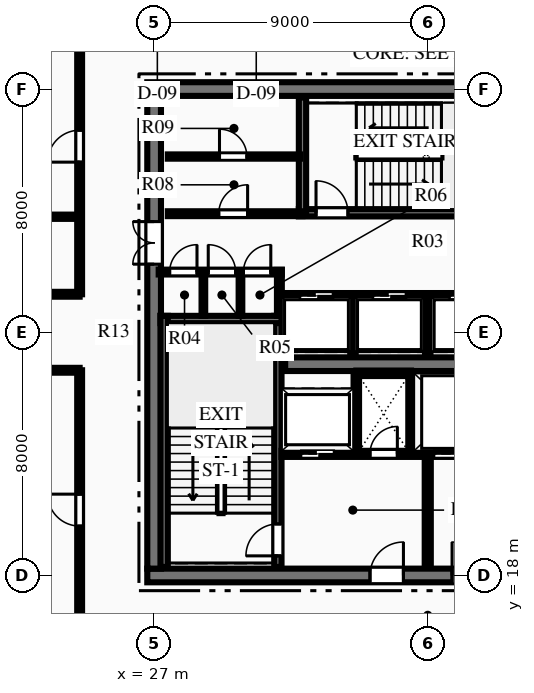
"""IFC4 building model, lengths in metres.
Left out: names, types, materials, properties, quantities, classifications, styles, units other than length and angle.
Written with IfcOpenShell. Run it as: python <this file> out.ifc"""

import sys

from ifc_helpers import new_model, si_unit, direction, frame, frame_2d, origin, place, context, subcontext, project, spatial, rectangle, extrude, element, fill, save


model = new_model("IFC4")
c1 = context("Model", 3, precision=1e-05, world=origin(), true_north=direction((0.0, 1.0)))
c2 = subcontext(c1, "Body", "Model", "MODEL_VIEW")
j1 = project(units=[si_unit("LENGTHUNIT", "METRE"), si_unit("PLANEANGLEUNIT", "RADIAN")], contexts=[c1])
p1 = place(None, origin())
s1 = spatial("IfcSite", under=j1, at=p1, CompositionType="ELEMENT")
p2 = place(p1, origin())
s2 = spatial("IfcBuilding", under=s1, at=p2, CompositionType="ELEMENT")
p3 = place(p2, frame((0.0, 0.0, 302.7)))
s3 = spatial("IfcBuildingStorey", under=s2, at=p3, CompositionType="ELEMENT", Elevation=302.7)
p4 = place(p3, frame((26.775, 18.0, 0.0), z_axis=(0.0, 0.0, 1.0), x_axis=(1.0, 0.0, 0.0)))
e1 = element("IfcWall", 1, at=p4, inside=s3, PredefinedType="SHEAR", context=c2, shape_type="SweptSolid", body=[
    extrude(rectangle(XDim=18.45, YDim=0.45, at=frame_2d((9.225, 0.0))), origin(), (0.0, 0.0, 1.0), 3.75),
])
p5 = place(p4, frame((7.325, 0.0, 0.0)))
e2 = element("IfcOpeningElement", 2, at=p5, cuts=e1, PredefinedType="OPENING", context=c2, shape_type="SweptSolid", body=[
    extrude(rectangle(XDim=1.1, YDim=2.15, at=frame_2d((0.55, 1.075))), frame((0.0, 0.235, 0.0), z_axis=(0.0, -1.0, 0.0), x_axis=(1.0, 0.0, 0.0)), (0.0, 0.0, 1.0), 0.47),
])
p6 = place(p4, frame((10.025, 0.0, 0.0)))
e3 = element("IfcOpeningElement", 3, at=p6, cuts=e1, PredefinedType="OPENING", context=c2, shape_type="SweptSolid", body=[
    extrude(rectangle(XDim=1.1, YDim=2.15, at=frame_2d((0.55, 1.075))), frame((0.0, 0.235, 0.0), z_axis=(0.0, -1.0, 0.0), x_axis=(1.0, 0.0, 0.0)), (0.0, 0.0, 1.0), 0.47),
])
p7 = place(p3, frame((26.775, 34.0, 0.0), z_axis=(0.0, 0.0, 1.0), x_axis=(1.0, 0.0, 0.0)))
e4 = element("IfcWall", 4, at=p7, inside=s3, PredefinedType="SHEAR", context=c2, shape_type="SweptSolid", body=[
    extrude(rectangle(XDim=18.45, YDim=0.45, at=frame_2d((9.225, 0.0))), origin(), (0.0, 0.0, 1.0), 3.75),
])
p8 = place(p3, frame((27.0, 18.225, 0.0), z_axis=(0.0, 0.0, 1.0), x_axis=(0.0, 1.0, 0.0)))
e5 = element("IfcWall", 5, at=p8, inside=s3, PredefinedType="SHEAR", context=c2, shape_type="SweptSolid", body=[
    extrude(rectangle(XDim=15.55, YDim=0.45, at=frame_2d((7.775, 0.0))), origin(), (0.0, 0.0, 1.0), 3.75),
])
p9 = place(p8, frame((10.015, 0.0, 0.0)))
e6 = element("IfcOpeningElement", 6, at=p9, cuts=e5, PredefinedType="OPENING", context=c2, shape_type="SweptSolid", body=[
    extrude(rectangle(XDim=1.4, YDim=2.2, at=frame_2d((0.7, 1.1))), frame((0.0, 0.235, 0.0), z_axis=(0.0, -1.0, 0.0), x_axis=(1.0, 0.0, 0.0)), (0.0, 0.0, 1.0), 0.47),
])
p10 = place(p3, frame((31.31, 24.95, 0.0), z_axis=(0.0, 0.0, 1.0), x_axis=(1.0, 0.0, 0.0)))
e7 = element("IfcWall", 7, at=p10, inside=s3, PredefinedType="SHEAR", context=c2, shape_type="SweptSolid", body=[
    extrude(rectangle(XDim=9.38, YDim=0.45, at=frame_2d((4.69, 0.0))), origin(), (0.0, 0.0, 1.0), 3.75),
])
p11 = place(p3, frame((31.07, 18.28, 0.0), z_axis=(0.0, 0.0, 1.0), x_axis=(0.0, 1.0, 0.0)))
e8 = element("IfcWall", 8, at=p11, inside=s3, PredefinedType="SHEAR", context=c2, shape_type="SweptSolid", body=[
    extrude(rectangle(XDim=8.26, YDim=0.24, at=frame_2d((4.13, 0.0))), origin(), (0.0, 0.0, 1.0), 3.75),
])
p12 = place(p11, frame((0.365, 0.0, 0.0)))
e9 = element("IfcOpeningElement", 9, at=p12, cuts=e8, PredefinedType="OPENING", context=c2, shape_type="SweptSolid", body=[
    extrude(rectangle(XDim=1.05, YDim=2.15, at=frame_2d((0.525, 1.075))), frame((0.0, 0.13, 0.0), z_axis=(0.0, -1.0, 0.0), x_axis=(1.0, 0.0, 0.0)), (0.0, 0.0, 1.0), 0.26),
])
p13 = place(p3, frame((27.21, 26.42, 0.0), z_axis=(0.0, 0.0, 1.0), x_axis=(1.0, 0.0, 0.0)))
e10 = element("IfcWall", 10, at=p13, inside=s3, PredefinedType="SHEAR", context=c2, shape_type="SweptSolid", body=[
    extrude(rectangle(XDim=3.98, YDim=0.24, at=frame_2d((1.99, 0.0))), origin(), (0.0, 0.0, 1.0), 3.75),
])
p14 = place(p3, frame((27.33, 18.28, 0.0), z_axis=(0.0, 0.0, 1.0), x_axis=(0.0, 1.0, 0.0)))
e11 = element("IfcWall", 11, at=p14, inside=s3, PredefinedType="SHEAR", context=c2, shape_type="SweptSolid", body=[
    extrude(rectangle(XDim=8.26, YDim=0.24, at=frame_2d((4.13, 0.0))), origin(), (0.0, 0.0, 1.0), 3.75),
])
p15 = place(p3, frame((31.76, 29.93, 0.0), z_axis=(0.0, 0.0, 1.0), x_axis=(1.0, 0.0, 0.0)))
e12 = element("IfcWall", 12, at=p15, inside=s3, PredefinedType="SHEAR", context=c2, shape_type="SweptSolid", body=[
    extrude(rectangle(XDim=8.38, YDim=0.24, at=frame_2d((4.19, 0.0))), origin(), (0.0, 0.0, 1.0), 3.75),
])
p16 = place(p15, frame((0.565, 0.0, 0.0)))
e13 = element("IfcOpeningElement", 13, at=p16, cuts=e12, PredefinedType="OPENING", context=c2, shape_type="SweptSolid", body=[
    extrude(rectangle(XDim=1.05, YDim=2.15, at=frame_2d((0.525, 1.075))), frame((0.0, 0.13, 0.0), z_axis=(0.0, -1.0, 0.0), x_axis=(1.0, 0.0, 0.0)), (0.0, 0.0, 1.0), 0.26),
])
p17 = place(p3, frame((31.88, 29.93, 0.0), z_axis=(0.0, 0.0, 1.0), x_axis=(0.0, 1.0, 0.0)))
e14 = element("IfcWall", 14, at=p17, inside=s3, PredefinedType="SHEAR", context=c2, shape_type="SweptSolid", body=[
    extrude(rectangle(XDim=3.79, YDim=0.24, at=frame_2d((1.895, 0.0))), origin(), (0.0, 0.0, 1.0), 3.75),
])
p18 = place(p3, frame((36.0, 18.28, 0.0), z_axis=(0.0, 0.0, 1.0), x_axis=(0.0, 1.0, 0.0)))
e15 = element("IfcWall", 15, at=p18, inside=s3, PredefinedType="PARTITIONING", context=c2, shape_type="SweptSolid", body=[
    extrude(rectangle(XDim=3.77, YDim=0.2, at=frame_2d((1.885, 0.0))), origin(), (0.0, 0.0, 1.0), 3.49),
])
p19 = place(p3, frame((31.19, 22.0, 0.0), z_axis=(0.0, 0.0, 1.0), x_axis=(1.0, 0.0, 0.0)))
e16 = element("IfcWall", 16, at=p19, inside=s3, PredefinedType="PARTITIONING", context=c2, shape_type="SweptSolid", body=[
    extrude(rectangle(XDim=4.69, YDim=0.2, at=frame_2d((2.345, 0.0))), origin(), (0.0, 0.0, 1.0), 3.49),
])
p20 = place(p19, frame((2.91, 0.0, 0.0)))
e17 = element("IfcOpeningElement", 17, at=p20, cuts=e16, PredefinedType="OPENING", context=c2, shape_type="SweptSolid", body=[
    extrude(rectangle(XDim=0.9, YDim=2.15, at=frame_2d((0.45, 1.075))), frame((0.0, 0.11, 0.0), z_axis=(0.0, -1.0, 0.0), x_axis=(1.0, 0.0, 0.0)), (0.0, 0.0, 1.0), 0.22),
])
p21 = place(p19, frame((0.635, 0.0, 0.0)))
e18 = element("IfcOpeningElement", 18, at=p21, cuts=e16, PredefinedType="OPENING", context=c2, shape_type="SweptSolid", body=[
    extrude(rectangle(XDim=1.1, YDim=2.15, at=frame_2d((0.55, 1.075))), frame((0.0, 0.11, 0.0), z_axis=(0.0, -1.0, 0.0), x_axis=(1.0, 0.0, 0.0)), (0.0, 0.0, 1.0), 0.22),
])
p22 = place(p3, frame((36.12, 22.0, 0.0), z_axis=(0.0, 0.0, 1.0), x_axis=(1.0, 0.0, 0.0)))
e19 = element("IfcWall", 19, at=p22, inside=s3, PredefinedType="PARTITIONING", context=c2, shape_type="SweptSolid", body=[
    extrude(rectangle(XDim=4.69, YDim=0.2, at=frame_2d((2.345, 0.0))), origin(), (0.0, 0.0, 1.0), 3.49),
])
p23 = place(p22, frame((2.955, 0.0, 0.0)))
e20 = element("IfcOpeningElement", 20, at=p23, cuts=e19, PredefinedType="OPENING", context=c2, shape_type="SweptSolid", body=[
    extrude(rectangle(XDim=1.1, YDim=2.15, at=frame_2d((0.55, 1.075))), frame((0.0, 0.11, 0.0), z_axis=(0.0, -1.0, 0.0), x_axis=(1.0, 0.0, 0.0)), (0.0, 0.0, 1.0), 0.22),
])
p24 = place(p22, frame((0.08, 0.0, 0.0)))
e21 = element("IfcOpeningElement", 21, at=p24, cuts=e19, PredefinedType="OPENING", context=c2, shape_type="SweptSolid", body=[
    extrude(rectangle(XDim=1.4, YDim=2.2, at=frame_2d((0.7, 1.1))), frame((0.0, 0.11, 0.0), z_axis=(0.0, -1.0, 0.0), x_axis=(1.0, 0.0, 0.0)), (0.0, 0.0, 1.0), 0.22),
])
for number, where, z_axis, x_axis in (
    (22, (33.65, 22.05, 0.0), (0.0, 0.0, 1.0), (0.0, 1.0, 0.0)),
    (23, (35.45, 22.05, 0.0), (0.0, 0.0, 1.0), (0.0, 1.0, 0.0)),
):
    element("IfcWall", number, at=place(p3, frame(where, z_axis=z_axis, x_axis=x_axis)), inside=s3, PredefinedType="PARTITIONING", context=c2, shape_type="SweptSolid", body=[
        extrude(rectangle(XDim=2.6, YDim=0.18, at=frame_2d((1.3, 0.0))), origin(), (0.0, 0.0, 1.0), 3.49),
    ])
p25 = place(p3, frame((33.65, 24.65, 0.0), z_axis=(0.0, 0.0, 1.0), x_axis=(1.0, 0.0, 0.0)))
e24 = element("IfcWall", 24, at=p25, inside=s3, PredefinedType="PARTITIONING", context=c2, shape_type="SweptSolid", body=[
    extrude(rectangle(XDim=1.8, YDim=0.18, at=frame_2d((0.9, 0.0))), origin(), (0.0, 0.0, 1.0), 3.49),
])
p26 = place(p3, frame((27.15, 27.98, 0.0), z_axis=(0.0, 0.0, 1.0), x_axis=(1.0, 0.0, 0.0)))
e25 = element("IfcWall", 25, at=p26, inside=s3, PredefinedType="PARTITIONING", context=c2, shape_type="SweptSolid", body=[
    extrude(rectangle(XDim=4.05, YDim=0.16, at=frame_2d((2.025, 0.0))), origin(), (0.0, 0.0, 1.0), 3.49),
])
p27 = place(p26, frame((0.36, 0.0, 0.0)))
e26 = element("IfcOpeningElement", 26, at=p27, cuts=e25, PredefinedType="OPENING", context=c2, shape_type="SweptSolid", body=[
    extrude(rectangle(XDim=0.9, YDim=2.15, at=frame_2d((0.45, 1.075))), frame((0.0, 0.09, 0.0), z_axis=(0.0, -1.0, 0.0), x_axis=(1.0, 0.0, 0.0)), (0.0, 0.0, 1.0), 0.18),
])
p28 = place(p26, frame((1.63, 0.0, 0.0)))
e27 = element("IfcOpeningElement", 27, at=p28, cuts=e25, PredefinedType="OPENING", context=c2, shape_type="SweptSolid", body=[
    extrude(rectangle(XDim=0.9, YDim=2.15, at=frame_2d((0.45, 1.075))), frame((0.0, 0.09, 0.0), z_axis=(0.0, -1.0, 0.0), x_axis=(1.0, 0.0, 0.0)), (0.0, 0.0, 1.0), 0.18),
])
p29 = place(p26, frame((2.788, 0.0, 0.0)))
e28 = element("IfcOpeningElement", 28, at=p29, cuts=e25, PredefinedType="OPENING", context=c2, shape_type="SweptSolid", body=[
    extrude(rectangle(XDim=0.9, YDim=2.15, at=frame_2d((0.45, 1.075))), frame((0.0, 0.09, 0.0), z_axis=(0.0, -1.0, 0.0), x_axis=(1.0, 0.0, 0.0)), (0.0, 0.0, 1.0), 0.18),
])
p30 = place(p3, frame((31.12, 26.54, 0.0), z_axis=(0.0, 0.0, 1.0), x_axis=(0.0, 1.0, 0.0)))
e29 = element("IfcWall", 29, at=p30, inside=s3, PredefinedType="PARTITIONING", context=c2, shape_type="SweptSolid", body=[
    extrude(rectangle(XDim=1.51, YDim=0.16, at=frame_2d((0.755, 0.0))), origin(), (0.0, 0.0, 1.0), 3.49),
])
for number, where, z_axis, x_axis in (
    (30, (28.62, 26.54, 0.0), (0.0, 0.0, 1.0), (0.0, 1.0, 0.0)),
    (31, (29.84, 26.54, 0.0), (0.0, 0.0, 1.0), (0.0, 1.0, 0.0)),
):
    element("IfcWall", number, at=place(p3, frame(where, z_axis=z_axis, x_axis=x_axis)), inside=s3, PredefinedType="PARTITIONING", context=c2, shape_type="SweptSolid", body=[
        extrude(rectangle(XDim=1.44, YDim=0.12, at=frame_2d((0.72, 0.0))), origin(), (0.0, 0.0, 1.0), 3.49),
    ])
p31 = place(p3, frame((27.45, 29.9, 0.0), z_axis=(0.0, 0.0, 1.0), x_axis=(1.0, 0.0, 0.0)))
e32 = element("IfcWall", 32, at=p31, inside=s3, PredefinedType="PARTITIONING", context=c2, shape_type="SweptSolid", body=[
    extrude(rectangle(XDim=4.43, YDim=0.16, at=frame_2d((2.215, 0.0))), origin(), (0.0, 0.0, 1.0), 3.49),
])
p32 = place(p31, frame((1.675, 0.0, 0.0)))
e33 = element("IfcOpeningElement", 33, at=p32, cuts=e32, PredefinedType="OPENING", context=c2, shape_type="SweptSolid", body=[
    extrude(rectangle(XDim=0.95, YDim=2.15, at=frame_2d((0.475, 1.075))), frame((0.0, 0.09, 0.0), z_axis=(0.0, -1.0, 0.0), x_axis=(1.0, 0.0, 0.0)), (0.0, 0.0, 1.0), 0.18),
])
p33 = place(p3, frame((27.45, 31.78, 0.0), z_axis=(0.0, 0.0, 1.0), x_axis=(1.0, 0.0, 0.0)))
e34 = element("IfcWall", 34, at=p33, inside=s3, PredefinedType="PARTITIONING", context=c2, shape_type="SweptSolid", body=[
    extrude(rectangle(XDim=4.35, YDim=0.14, at=frame_2d((2.175, 0.0))), origin(), (0.0, 0.0, 1.0), 3.49),
])
p34 = place(p33, frame((1.7, 0.0, 0.0)))
e35 = element("IfcOpeningElement", 35, at=p34, cuts=e34, PredefinedType="OPENING", context=c2, shape_type="SweptSolid", body=[
    extrude(rectangle(XDim=0.9, YDim=2.15, at=frame_2d((0.45, 1.075))), frame((0.0, 0.08, 0.0), z_axis=(0.0, -1.0, 0.0), x_axis=(1.0, 0.0, 0.0)), (0.0, 0.0, 1.0), 0.16),
])
p35 = place(p3, frame((31.2, 27.2, 0.0), z_axis=(0.0, 0.0, 1.0), x_axis=(1.0, 0.0, 0.0)))
e36 = element("IfcWall", 36, at=p35, inside=s3, PredefinedType="PARTITIONING", context=c2, shape_type="SweptSolid", body=[
    extrude(rectangle(XDim=9.6, YDim=0.18, at=frame_2d((4.8, 0.0))), origin(), (0.0, 0.0, 1.0), 3.49),
])
p36 = place(p35, frame((0.59, 0.0, 0.0)))
e37 = element("IfcOpeningElement", 37, at=p36, cuts=e36, PredefinedType="OPENING", context=c2, shape_type="SweptSolid", body=[
    extrude(rectangle(XDim=1.1, YDim=2.15, at=frame_2d((0.55, 1.075))), frame((0.0, 0.1, 0.0), z_axis=(0.0, -1.0, 0.0), x_axis=(1.0, 0.0, 0.0)), (0.0, 0.0, 1.0), 0.2),
])
p37 = place(p35, frame((2.99, 0.0, 0.0)))
e38 = element("IfcOpeningElement", 38, at=p37, cuts=e36, PredefinedType="OPENING", context=c2, shape_type="SweptSolid", body=[
    extrude(rectangle(XDim=1.1, YDim=2.15, at=frame_2d((0.55, 1.075))), frame((0.0, 0.1, 0.0), z_axis=(0.0, -1.0, 0.0), x_axis=(1.0, 0.0, 0.0)), (0.0, 0.0, 1.0), 0.2),
])
p38 = place(p35, frame((5.51, 0.0, 0.0)))
e39 = element("IfcOpeningElement", 39, at=p38, cuts=e36, PredefinedType="OPENING", context=c2, shape_type="SweptSolid", body=[
    extrude(rectangle(XDim=1.1, YDim=2.15, at=frame_2d((0.55, 1.075))), frame((0.0, 0.1, 0.0), z_axis=(0.0, -1.0, 0.0), x_axis=(1.0, 0.0, 0.0)), (0.0, 0.0, 1.0), 0.2),
])
p39 = place(p35, frame((7.91, 0.0, 0.0)))
e40 = element("IfcOpeningElement", 40, at=p39, cuts=e36, PredefinedType="OPENING", context=c2, shape_type="SweptSolid", body=[
    extrude(rectangle(XDim=1.1, YDim=2.15, at=frame_2d((0.55, 1.075))), frame((0.0, 0.1, 0.0), z_axis=(0.0, -1.0, 0.0), x_axis=(1.0, 0.0, 0.0)), (0.0, 0.0, 1.0), 0.2),
])
for number, where, z_axis, x_axis in (
    (41, (33.54, 25.3, 0.0), (0.0, 0.0, 1.0), (0.0, 1.0, 0.0)),
    (42, (36.0, 25.3, 0.0), (0.0, 0.0, 1.0), (0.0, 1.0, 0.0)),
):
    element("IfcWall", number, at=place(p3, frame(where, z_axis=z_axis, x_axis=x_axis)), inside=s3, PredefinedType="PARTITIONING", context=c2, shape_type="SweptSolid", body=[
        extrude(rectangle(XDim=1.9, YDim=0.18, at=frame_2d((0.95, 0.0))), origin(), (0.0, 0.0, 1.0), 3.49),
    ])
p40 = place(p3, frame((24.55, 15.55, 0.0), z_axis=(0.0, 0.0, 1.0), x_axis=(0.0, 1.0, 0.0)))
e43 = element("IfcWall", 43, at=p40, inside=s3, PredefinedType="PARTITIONING", context=c2, shape_type="SweptSolid", body=[
    extrude(rectangle(XDim=9.2, YDim=0.16, at=frame_2d((4.6, 0.0))), origin(), (0.0, 0.0, 1.0), 3.49),
])
p41 = place(p40, frame((4.075, 0.0, 0.0)))
e44 = element("IfcOpeningElement", 44, at=p41, cuts=e43, PredefinedType="OPENING", context=c2, shape_type="SweptSolid", body=[
    extrude(rectangle(XDim=1.05, YDim=2.15, at=frame_2d((0.525, 1.075))), frame((0.0, 0.09, 0.0), z_axis=(0.0, -1.0, 0.0), x_axis=(1.0, 0.0, 0.0)), (0.0, 0.0, 1.0), 0.18),
])
p42 = place(p3, frame((24.55, 27.25, 0.0), z_axis=(0.0, 0.0, 1.0), x_axis=(0.0, 1.0, 0.0)))
e45 = element("IfcWall", 45, at=p42, inside=s3, PredefinedType="PARTITIONING", context=c2, shape_type="SweptSolid", body=[
    extrude(rectangle(XDim=9.2, YDim=0.16, at=frame_2d((4.6, 0.0))), origin(), (0.0, 0.0, 1.0), 3.49),
])
p43 = place(p42, frame((4.346, 0.0, 0.0)))
e46 = element("IfcOpeningElement", 46, at=p43, cuts=e45, PredefinedType="OPENING", context=c2, shape_type="SweptSolid", body=[
    extrude(rectangle(XDim=1.05, YDim=2.15, at=frame_2d((0.525, 1.075))), frame((0.0, 0.09, 0.0), z_axis=(0.0, -1.0, 0.0), x_axis=(1.0, 0.0, 0.0)), (0.0, 0.0, 1.0), 0.18),
])
for number, where, z_axis, x_axis in (
    (47, (17.7, 24.75, 0.0), (0.0, 0.0, 1.0), (1.0, 0.0, 0.0)),
    (48, (17.7, 27.25, 0.0), (0.0, 0.0, 1.0), (1.0, 0.0, 0.0)),
):
    element("IfcWall", number, at=place(p3, frame(where, z_axis=z_axis, x_axis=x_axis)), inside=s3, PredefinedType="PARTITIONING", context=c2, shape_type="SweptSolid", body=[
        extrude(rectangle(XDim=6.85, YDim=0.16, at=frame_2d((3.425, 0.0))), origin(), (0.0, 0.0, 1.0), 3.49),
    ])
p44 = place(p3, frame((14.059, 29.8, 0.0), z_axis=(0.0, 0.0, 1.0), x_axis=(1.0, 0.0, 0.0)))
e49 = element("IfcWall", 49, at=p44, inside=s3, PredefinedType="PARTITIONING", context=c2, shape_type="SweptSolid", body=[
    extrude(rectangle(XDim=10.491, YDim=0.14, at=frame_2d((5.246, 0.0))), origin(), (0.0, 0.0, 1.0), 3.49),
])
p45 = place(p27, origin())
e50 = element("IfcDoor", 50, at=p45, inside=s3, OperationType="SINGLE_SWING_RIGHT", PredefinedType="DOOR", context=c2, shape_type="SweptSolid", body=[
    extrude(rectangle(XDim=0.9, YDim=2.15, at=frame_2d((0.45, 1.075))), frame((0.0, 0.025, 0.0), z_axis=(0.0, -1.0, 0.0), x_axis=(1.0, 0.0, 0.0)), (0.0, 0.0, 1.0), 0.05),
])
fill(e26, e50)
p46 = place(p28, origin())
e51 = element("IfcDoor", 51, at=p46, inside=s3, OperationType="SINGLE_SWING_LEFT", PredefinedType="DOOR", context=c2, shape_type="SweptSolid", body=[
    extrude(rectangle(XDim=0.9, YDim=2.15, at=frame_2d((0.45, 1.075))), frame((0.0, 0.025, 0.0), z_axis=(0.0, -1.0, 0.0), x_axis=(1.0, 0.0, 0.0)), (0.0, 0.0, 1.0), 0.05),
])
fill(e27, e51)
p47 = place(p29, origin())
e52 = element("IfcDoor", 52, at=p47, inside=s3, OperationType="SINGLE_SWING_RIGHT", PredefinedType="DOOR", context=c2, shape_type="SweptSolid", body=[
    extrude(rectangle(XDim=0.9, YDim=2.15, at=frame_2d((0.45, 1.075))), frame((0.0, 0.025, 0.0), z_axis=(0.0, -1.0, 0.0), x_axis=(1.0, 0.0, 0.0)), (0.0, 0.0, 1.0), 0.05),
])
fill(e28, e52)
p48 = place(p32, origin())
e53 = element("IfcDoor", 53, at=p48, inside=s3, OperationType="SINGLE_SWING_RIGHT", PredefinedType="DOOR", context=c2, shape_type="SweptSolid", body=[
    extrude(rectangle(XDim=0.95, YDim=2.15, at=frame_2d((0.475, 1.075))), frame((0.0, 0.025, 0.0), z_axis=(0.0, -1.0, 0.0), x_axis=(1.0, 0.0, 0.0)), (0.0, 0.0, 1.0), 0.05),
])
fill(e33, e53)
p49 = place(p34, origin())
e54 = element("IfcDoor", 54, at=p49, inside=s3, OperationType="SINGLE_SWING_LEFT", PredefinedType="DOOR", context=c2, shape_type="SweptSolid", body=[
    extrude(rectangle(XDim=0.9, YDim=2.15, at=frame_2d((0.45, 1.075))), frame((0.0, 0.025, 0.0), z_axis=(0.0, -1.0, 0.0), x_axis=(1.0, 0.0, 0.0)), (0.0, 0.0, 1.0), 0.05),
])
fill(e35, e54)
p50 = place(p12, origin())
e55 = element("IfcDoor", 55, at=p50, inside=s3, OperationType="SINGLE_SWING_LEFT", PredefinedType="DOOR", context=c2, shape_type="SweptSolid", body=[
    extrude(rectangle(XDim=1.05, YDim=2.15, at=frame_2d((0.525, 1.075))), frame((0.0, 0.025, 0.0), z_axis=(0.0, -1.0, 0.0), x_axis=(1.0, 0.0, 0.0)), (0.0, 0.0, 1.0), 0.05),
])
fill(e9, e55)
p51 = place(p16, origin())
e56 = element("IfcDoor", 56, at=p51, inside=s3, OperationType="SINGLE_SWING_LEFT", PredefinedType="DOOR", context=c2, shape_type="SweptSolid", body=[
    extrude(rectangle(XDim=1.05, YDim=2.15, at=frame_2d((0.525, 1.075))), frame((0.0, 0.025, 0.0), z_axis=(0.0, -1.0, 0.0), x_axis=(1.0, 0.0, 0.0)), (0.0, 0.0, 1.0), 0.05),
])
fill(e13, e56)
p52 = place(p5, origin())
e57 = element("IfcDoor", 57, at=p52, inside=s3, OperationType="SINGLE_SWING_RIGHT", PredefinedType="DOOR", context=c2, shape_type="SweptSolid", body=[
    extrude(rectangle(XDim=1.1, YDim=2.15, at=frame_2d((0.55, 1.075))), frame((0.0, 0.025, 0.0), z_axis=(0.0, -1.0, 0.0), x_axis=(1.0, 0.0, 0.0)), (0.0, 0.0, 1.0), 0.05),
])
fill(e2, e57)
p53 = place(p6, origin())
e58 = element("IfcDoor", 58, at=p53, inside=s3, OperationType="SINGLE_SWING_LEFT", PredefinedType="DOOR", context=c2, shape_type="SweptSolid", body=[
    extrude(rectangle(XDim=1.1, YDim=2.15, at=frame_2d((0.55, 1.075))), frame((0.0, 0.025, 0.0), z_axis=(0.0, -1.0, 0.0), x_axis=(1.0, 0.0, 0.0)), (0.0, 0.0, 1.0), 0.05),
])
fill(e3, e58)
p54 = place(p20, origin())
e59 = element("IfcDoor", 59, at=p54, inside=s3, OperationType="SINGLE_SWING_RIGHT", PredefinedType="DOOR", context=c2, shape_type="SweptSolid", body=[
    extrude(rectangle(XDim=0.9, YDim=2.15, at=frame_2d((0.45, 1.075))), frame((0.0, 0.025, 0.0), z_axis=(0.0, -1.0, 0.0), x_axis=(1.0, 0.0, 0.0)), (0.0, 0.0, 1.0), 0.05),
])
fill(e17, e59)
p55 = place(p9, origin())
e60 = element("IfcDoor", 60, at=p55, inside=s3, OperationType="DOUBLE_DOOR_SINGLE_SWING", PredefinedType="DOOR", context=c2, shape_type="SweptSolid", body=[
    extrude(rectangle(XDim=1.4, YDim=2.2, at=frame_2d((0.7, 1.1))), frame((0.0, 0.025, 0.0), z_axis=(0.0, -1.0, 0.0), x_axis=(1.0, 0.0, 0.0)), (0.0, 0.0, 1.0), 0.05),
])
fill(e6, e60)
p56 = place(p41, origin())
e61 = element("IfcDoor", 61, at=p56, inside=s3, OperationType="SINGLE_SWING_RIGHT", PredefinedType="DOOR", context=c2, shape_type="SweptSolid", body=[
    extrude(rectangle(XDim=1.05, YDim=2.15, at=frame_2d((0.525, 1.075))), frame((0.0, 0.025, 0.0), z_axis=(0.0, -1.0, 0.0), x_axis=(1.0, 0.0, 0.0)), (0.0, 0.0, 1.0), 0.05),
])
fill(e44, e61)
p57 = place(p43, origin())
e62 = element("IfcDoor", 62, at=p57, inside=s3, OperationType="SINGLE_SWING_LEFT", PredefinedType="DOOR", context=c2, shape_type="SweptSolid", body=[
    extrude(rectangle(XDim=1.05, YDim=2.15, at=frame_2d((0.525, 1.075))), frame((0.0, 0.025, 0.0), z_axis=(0.0, -1.0, 0.0), x_axis=(1.0, 0.0, 0.0)), (0.0, 0.0, 1.0), 0.05),
])
fill(e46, e62)
p58 = place(p36, origin())
e63 = element("IfcDoor", 63, at=p58, inside=s3, OperationType="SLIDING_TO_LEFT", PredefinedType="DOOR", context=c2, shape_type="SweptSolid", body=[
    extrude(rectangle(XDim=1.1, YDim=2.15, at=frame_2d((0.55, 1.075))), frame((0.0, 0.025, 0.0), z_axis=(0.0, -1.0, 0.0), x_axis=(1.0, 0.0, 0.0)), (0.0, 0.0, 1.0), 0.05),
])
fill(e37, e63)
p59 = place(p37, origin())
e64 = element("IfcDoor", 64, at=p59, inside=s3, OperationType="SLIDING_TO_LEFT", PredefinedType="DOOR", context=c2, shape_type="SweptSolid", body=[
    extrude(rectangle(XDim=1.1, YDim=2.15, at=frame_2d((0.55, 1.075))), frame((0.0, 0.025, 0.0), z_axis=(0.0, -1.0, 0.0), x_axis=(1.0, 0.0, 0.0)), (0.0, 0.0, 1.0), 0.05),
])
fill(e38, e64)
p60 = place(p38, origin())
e65 = element("IfcDoor", 65, at=p60, inside=s3, OperationType="SLIDING_TO_LEFT", PredefinedType="DOOR", context=c2, shape_type="SweptSolid", body=[
    extrude(rectangle(XDim=1.1, YDim=2.15, at=frame_2d((0.55, 1.075))), frame((0.0, 0.025, 0.0), z_axis=(0.0, -1.0, 0.0), x_axis=(1.0, 0.0, 0.0)), (0.0, 0.0, 1.0), 0.05),
])
fill(e39, e65)
p61 = place(p21, origin())
e66 = element("IfcDoor", 66, at=p61, inside=s3, OperationType="SLIDING_TO_LEFT", PredefinedType="DOOR", context=c2, shape_type="SweptSolid", body=[
    extrude(rectangle(XDim=1.1, YDim=2.15, at=frame_2d((0.55, 1.075))), frame((0.0, 0.025, 0.0), z_axis=(0.0, -1.0, 0.0), x_axis=(1.0, 0.0, 0.0)), (0.0, 0.0, 1.0), 0.05),
])
fill(e18, e66)
p62 = place(p24, origin())
e67 = element("IfcDoor", 67, at=p62, inside=s3, OperationType="SLIDING_TO_LEFT", PredefinedType="DOOR", context=c2, shape_type="SweptSolid", body=[
    extrude(rectangle(XDim=1.4, YDim=2.2, at=frame_2d((0.7, 1.1))), frame((0.0, 0.025, 0.0), z_axis=(0.0, -1.0, 0.0), x_axis=(1.0, 0.0, 0.0)), (0.0, 0.0, 1.0), 0.05),
])
fill(e21, e67)
save(model, sys.argv[1])
